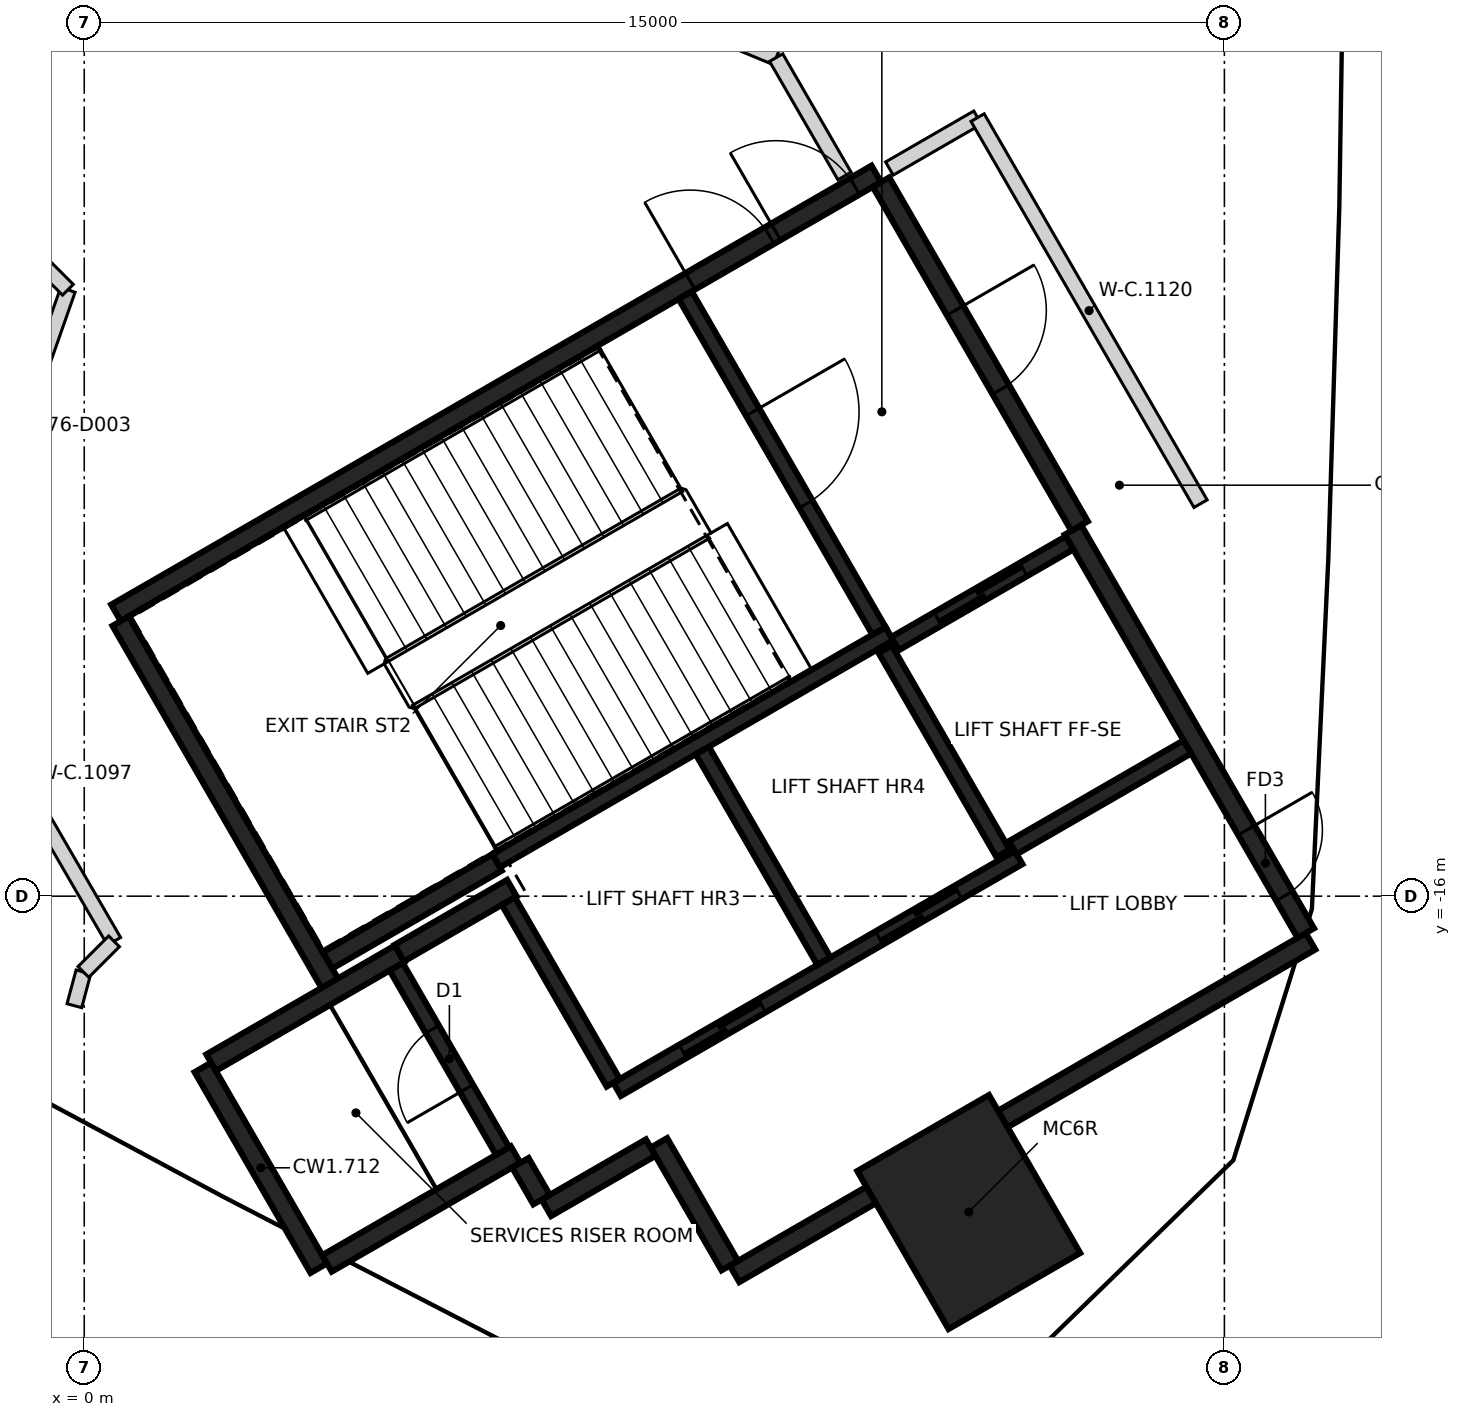
"""IFC4 building model, lengths in metres.
Left out: names, types, materials, properties, quantities, classifications, styles, units other than length and angle.
Written with IfcOpenShell. Run it as: python <this file> out.ifc"""

import sys

from ifc_helpers import new_model, si_unit, direction, frame, frame_2d, origin, origin_2d, place, context, subcontext, project, spatial, rectangle, extrude, element, fill, save


model = new_model("IFC4")
c1 = context("Model", 3, precision=1e-05, world=origin(), true_north=direction((0.0, 1.0)))
c2 = subcontext(c1, "Body", "Model", "MODEL_VIEW")
j1 = project(units=[si_unit("LENGTHUNIT", "METRE"), si_unit("PLANEANGLEUNIT", "RADIAN")], contexts=[c1])
p1 = place(None, origin())
s1 = spatial("IfcSite", under=j1, at=p1, CompositionType="ELEMENT")
p2 = place(p1, origin())
s2 = spatial("IfcBuilding", under=s1, at=p2, CompositionType="ELEMENT")
p3 = place(p2, frame((0.0, 0.0, 301.8)))
s3 = spatial("IfcBuildingStorey", under=s2, at=p3, CompositionType="ELEMENT", Elevation=301.8)
p4 = place(p3, frame((11.637, -20.155, -0.4), z_axis=(0.0, 0.0, 1.0), x_axis=(-0.5, 0.866025403784, 0.0)))
e1 = element("IfcColumn", 1, at=p4, inside=s3, PredefinedType="COLUMN", context=c2, shape_type="SweptSolid", body=[
    extrude(rectangle(XDim=2.4, YDim=2.0, at=origin_2d()), origin(), (0.0, 0.0, 1.0), 4.85),
])
p5 = place(p3, frame((0.417, -12.273, 0.0), z_axis=(0.0, 0.0, 1.0), x_axis=(0.866021906294, 0.500006057782, 0.0)))
e2 = element("IfcWall", 2, at=p5, inside=s3, PredefinedType="SHEAR", context=c2, shape_type="SweptSolid", body=[
    extrude(rectangle(XDim=11.55, YDim=0.25, at=frame_2d((5.775, 0.0))), origin(), (0.0, 0.0, 1.0), 4.45),
])
p6 = place(p5, frame((10.025, 0.0, 0.0)))
e3 = element("IfcOpeningElement", 3, at=p6, cuts=e2, PredefinedType="OPENING", context=c2, shape_type="SweptSolid", body=[
    extrude(rectangle(XDim=1.2, YDim=2.1, at=frame_2d((0.6, 1.05))), frame((0.0, 0.135, 0.0), z_axis=(0.0, -1.0, 0.0), x_axis=(1.0, 0.0, 0.0)), (0.0, 0.0, 1.0), 0.27),
])
p7 = place(p5, frame((8.725, 0.0, 0.0)))
e4 = element("IfcOpeningElement", 4, at=p7, cuts=e2, PredefinedType="OPENING", context=c2, shape_type="SweptSolid", body=[
    extrude(rectangle(XDim=1.2, YDim=2.1, at=frame_2d((0.6, 1.05))), frame((0.0, 0.135, 0.0), z_axis=(0.0, -1.0, 0.0), x_axis=(1.0, 0.0, 0.0)), (0.0, 0.0, 1.0), 0.27),
])
p8 = place(p3, frame((16.133, -16.594, 0.0), z_axis=(0.0, 0.0, 1.0), x_axis=(-0.866022959057, -0.500004234368, 0.0)))
e5 = element("IfcWall", 5, at=p8, inside=s3, PredefinedType="SHEAR", context=c2, shape_type="SweptSolid", body=[
    extrude(rectangle(XDim=8.75, YDim=0.25, at=frame_2d((4.375, 0.0))), origin(), (0.0, 0.0, 1.0), 4.45),
])
p9 = place(p3, frame((13.008, -11.181, 0.0), z_axis=(0.0, 0.0, 1.0), x_axis=(0.500001955336, -0.866024274868, 0.0)))
e6 = element("IfcWall", 6, at=p9, inside=s3, PredefinedType="SHEAR", context=c2, shape_type="SweptSolid", body=[
    extrude(rectangle(XDim=6.125, YDim=0.25, at=frame_2d((3.062, 0.0))), origin(), (0.0, 0.0, 1.0), 4.45),
])
p10 = place(p9, frame((4.563, 0.0, 0.0)))
e7 = element("IfcOpeningElement", 7, at=p10, cuts=e6, PredefinedType="OPENING", context=c2, shape_type="SweptSolid", body=[
    extrude(rectangle(XDim=1.0, YDim=2.1, at=frame_2d((0.5, 1.05))), frame((0.0, 0.135, 0.0), z_axis=(0.0, -1.0, 0.0), x_axis=(1.0, 0.0, 0.0)), (0.0, 0.0, 1.0), 0.27),
])
p11 = place(p3, frame((3.235, -17.153, 0.0), z_axis=(0.0, 0.0, 1.0), x_axis=(-0.500008851346, 0.866020293397, 0.0)))
e8 = element("IfcWall", 8, at=p11, inside=s3, PredefinedType="SHEAR", context=c2, shape_type="SweptSolid", body=[
    extrude(rectangle(XDim=5.51, YDim=0.25, at=frame_2d((2.755, 0.0))), origin(), (0.0, 0.0, 1.0), 4.45),
])
p12 = place(p3, frame((10.483, -6.606, 0.0), z_axis=(0.0, 0.0, 1.0), x_axis=(0.49999885962, -0.866026062182, 0.0)))
e9 = element("IfcWall", 9, at=p12, inside=s3, PredefinedType="SHEAR", context=c2, shape_type="SweptSolid", body=[
    extrude(rectangle(XDim=5.225, YDim=0.25, at=frame_2d((2.612, 0.0))), origin(), (0.0, 0.0, 1.0), 4.45),
])
p13 = place(p12, frame((1.95, 0.0, 0.0)))
e10 = element("IfcOpeningElement", 10, at=p13, cuts=e9, PredefinedType="OPENING", context=c2, shape_type="SweptSolid", body=[
    extrude(rectangle(XDim=1.2, YDim=2.1, at=frame_2d((0.6, 1.05))), frame((0.0, 0.135, 0.0), z_axis=(0.0, -1.0, 0.0), x_axis=(1.0, 0.0, 0.0)), (0.0, 0.0, 1.0), 0.27),
])
p14 = place(p3, frame((3.085, -20.894, 0.0), z_axis=(0.0, 0.0, 1.0), x_axis=(-0.499978833458, 0.866037623948, 0.0)))
e11 = element("IfcWall", 11, at=p14, inside=s3, PredefinedType="SHEAR", context=c2, shape_type="SweptSolid", body=[
    extrude(rectangle(XDim=3.05, YDim=0.25, at=frame_2d((1.525, 0.0))), origin(), (0.0, 0.0, 1.0), 4.45),
])
p15 = place(p3, frame((1.669, -18.19, 0.0), z_axis=(0.0, 0.0, 1.0), x_axis=(0.866042235819, 0.499970844928, 0.0)))
e12 = element("IfcWall", 12, at=p15, inside=s3, PredefinedType="SHEAR", context=c2, shape_type="SweptSolid", body=[
    extrude(rectangle(XDim=2.865, YDim=0.25, at=frame_2d((1.432, 0.0))), origin(), (0.0, 0.0, 1.0), 4.45),
])
p16 = place(p3, frame((5.675, -19.399, 0.0), z_axis=(0.0, 0.0, 1.0), x_axis=(-0.866026637627, -0.499997862916, 0.0)))
e13 = element("IfcWall", 13, at=p16, inside=s3, PredefinedType="SHEAR", context=c2, shape_type="SweptSolid", body=[
    extrude(rectangle(XDim=2.865, YDim=0.25, at=frame_2d((1.432, 0.0))), origin(), (0.0, 0.0, 1.0), 4.45),
])
p17 = place(p3, frame((5.431, -15.556, 0.0), z_axis=(0.0, 0.0, 1.0), x_axis=(-0.866022940537, -0.500004266446, 0.0)))
e14 = element("IfcWall", 14, at=p17, inside=s3, PredefinedType="SHEAR", context=c2, shape_type="SweptSolid", body=[
    extrude(rectangle(XDim=2.575, YDim=0.25, at=frame_2d((1.287, 0.0))), origin(), (0.0, 0.0, 1.0), 4.45),
])
p18 = place(p3, frame((8.493, -20.86, 0.0), z_axis=(0.0, 0.0, 1.0), x_axis=(-0.500039802285, 0.866002422705, 0.0)))
e15 = element("IfcWall", 15, at=p18, inside=s3, PredefinedType="SHEAR", context=c2, shape_type="SweptSolid", body=[
    extrude(rectangle(XDim=1.865, YDim=0.25, at=frame_2d((0.932, 0.0))), origin(), (0.0, 0.0, 1.0), 4.45),
])
p19 = place(p3, frame((4.145, -16.749, 0.0), z_axis=(0.0, 0.0, 1.0), x_axis=(0.866038183914, 0.499977863513, 0.0)))
e16 = element("IfcWall", 16, at=p19, inside=s3, PredefinedType="SHEAR", context=c2, shape_type="SweptSolid", body=[
    extrude(rectangle(XDim=1.71, YDim=0.25, at=frame_2d((0.855, 0.0))), origin(), (0.0, 0.0, 1.0), 4.45),
])
p20 = place(p3, frame((7.452, -19.308, 0.0), z_axis=(0.0, 0.0, 1.0), x_axis=(-0.866044474677, -0.49996696679, 0.0)))
e17 = element("IfcWall", 17, at=p20, inside=s3, PredefinedType="SHEAR", context=c2, shape_type="SweptSolid", body=[
    extrude(rectangle(XDim=1.584, YDim=0.25, at=frame_2d((0.792, 0.0))), origin(), (0.0, 0.0, 1.0), 4.45),
])
p21 = place(p3, frame((6.017, -19.992, 0.0), z_axis=(0.0, 0.0, 1.0), x_axis=(-0.500364886717, 0.865814633822, 0.0)))
e18 = element("IfcWall", 18, at=p21, inside=s3, PredefinedType="SHEAR", context=c2, shape_type="SweptSolid", body=[
    extrude(rectangle(XDim=0.559, YDim=0.25, at=frame_2d((0.28, 0.0))), origin(), (0.0, 0.0, 1.0), 4.45),
])
p22 = place(p3, frame((5.419, -15.534, 0.0), z_axis=(0.0, 0.0, 1.0), x_axis=(0.866029065029, 0.499993658486, 0.0)))
e19 = element("IfcWall", 19, at=p22, inside=s3, PredefinedType="SHEAR", context=c2, shape_type="SweptSolid", body=[
    extrude(rectangle(XDim=5.974, YDim=0.2, at=frame_2d((2.987, 0.0))), origin(), (0.0, 0.0, 1.0), 4.45),
])
p23 = place(p3, frame((7.01, -18.542, 0.0), z_axis=(0.0, 0.0, 1.0), x_axis=(0.866030299012, 0.499991521122, 0.0)))
e20 = element("IfcWall", 20, at=p23, inside=s3, PredefinedType="SHEAR", context=c2, shape_type="SweptSolid", body=[
    extrude(rectangle(XDim=6.1, YDim=0.2, at=frame_2d((3.05, 0.0))), origin(), (0.0, 0.0, 1.0), 4.45),
])
p24 = place(p23, frame((1.0, 0.0, 0.0)))
e21 = element("IfcOpeningElement", 21, at=p24, cuts=e20, PredefinedType="OPENING", context=c2, shape_type="SweptSolid", body=[
    extrude(rectangle(XDim=1.2, YDim=2.1, at=frame_2d((0.6, 1.05))), frame((0.0, 0.11, 0.0), z_axis=(0.0, -1.0, 0.0), x_axis=(1.0, 0.0, 0.0)), (0.0, 0.0, 1.0), 0.22),
])
p25 = place(p23, frame((3.982, 0.0, 0.0)))
e22 = element("IfcOpeningElement", 22, at=p25, cuts=e20, PredefinedType="OPENING", context=c2, shape_type="SweptSolid", body=[
    extrude(rectangle(XDim=1.2, YDim=2.1, at=frame_2d((0.6, 1.05))), frame((0.0, 0.11, 0.0), z_axis=(0.0, -1.0, 0.0), x_axis=(1.0, 0.0, 0.0)), (0.0, 0.0, 1.0), 0.22),
])
p26 = place(p3, frame((7.906, -8.094, 0.0), z_axis=(0.0, 0.0, 1.0), x_axis=(0.500027839223, -0.866009330205, 0.0)))
e23 = element("IfcWall", 23, at=p26, inside=s3, PredefinedType="SHEAR", context=c2, shape_type="SweptSolid", body=[
    extrude(rectangle(XDim=5.098, YDim=0.2, at=frame_2d((2.549, 0.0))), origin(), (0.0, 0.0, 1.0), 4.45),
])
p27 = place(p26, frame((1.774, 0.0, 0.0)))
e24 = element("IfcOpeningElement", 24, at=p27, cuts=e23, PredefinedType="OPENING", context=c2, shape_type="SweptSolid", body=[
    extrude(rectangle(XDim=1.4, YDim=2.1, at=frame_2d((0.7, 1.05))), frame((0.0, 0.11, 0.0), z_axis=(0.0, -1.0, 0.0), x_axis=(1.0, 0.0, 0.0)), (0.0, 0.0, 1.0), 0.22),
])
p28 = place(p3, frame((8.132, -14.084, 0.0), z_axis=(0.0, 0.0, 1.0), x_axis=(0.499997778408, -0.866026686418, 0.0)))
e25 = element("IfcWall", 25, at=p28, inside=s3, PredefinedType="SHEAR", context=c2, shape_type="SweptSolid", body=[
    extrude(rectangle(XDim=3.198, YDim=0.2, at=frame_2d((1.599, 0.0))), origin(), (0.0, 0.0, 1.0), 4.45),
])
p29 = place(p3, frame((5.503, -19.352, 0.0), z_axis=(0.0, 0.0, 1.0), x_axis=(-0.499986818241, 0.866033014143, 0.0)))
e26 = element("IfcWall", 26, at=p29, inside=s3, PredefinedType="SHEAR", context=c2, shape_type="SweptSolid", body=[
    extrude(rectangle(XDim=2.798, YDim=0.2, at=frame_2d((1.399, 0.0))), origin(), (0.0, 0.0, 1.0), 4.45),
])
p30 = place(p29, frame((0.949, 0.0, 0.0)))
e27 = element("IfcOpeningElement", 27, at=p30, cuts=e26, PredefinedType="OPENING", context=c2, shape_type="SweptSolid", body=[
    extrude(rectangle(XDim=0.9, YDim=2.1, at=frame_2d((0.45, 1.05))), frame((0.0, 0.11, 0.0), z_axis=(0.0, -1.0, 0.0), x_axis=(1.0, 0.0, 0.0)), (0.0, 0.0, 1.0), 0.22),
])
p31 = place(p3, frame((6.96, -18.455, 0.0), z_axis=(0.0, 0.0, 1.0), x_axis=(-0.499926705758, 0.866067716099, 0.0)))
e28 = element("IfcWall", 28, at=p31, inside=s3, PredefinedType="SHEAR", context=c2, shape_type="SweptSolid", body=[
    extrude(rectangle(XDim=2.759, YDim=0.2, at=frame_2d((1.38, 0.0))), origin(), (0.0, 0.0, 1.0), 4.45),
])
p32 = place(p3, frame((12.088, -15.437, 0.0), z_axis=(0.0, 0.0, 1.0), x_axis=(-0.500026960575, 0.86600983753, 0.0)))
e29 = element("IfcWall", 29, at=p32, inside=s3, PredefinedType="SHEAR", context=c2, shape_type="SweptSolid", body=[
    extrude(rectangle(XDim=3.1, YDim=0.2, at=frame_2d((1.55, 0.0))), origin(), (0.0, 0.0, 1.0), 4.45),
])
p33 = place(p3, frame((10.666, -12.678, 0.0), z_axis=(0.0, 0.0, 1.0), x_axis=(0.866018407898, 0.500012117035, 0.0)))
e30 = element("IfcWall", 30, at=p33, inside=s3, PredefinedType="SHEAR", context=c2, shape_type="SweptSolid", body=[
    extrude(rectangle(XDim=2.651, YDim=0.2, at=frame_2d((1.325, 0.0))), origin(), (0.0, 0.0, 1.0), 4.45),
])
p34 = place(p33, frame((0.652, 0.0, 0.0)))
e31 = element("IfcOpeningElement", 31, at=p34, cuts=e30, PredefinedType="OPENING", context=c2, shape_type="SweptSolid", body=[
    extrude(rectangle(XDim=1.3, YDim=2.1, at=frame_2d((0.65, 1.05))), frame((0.0, 0.11, 0.0), z_axis=(0.0, -1.0, 0.0), x_axis=(1.0, 0.0, 0.0)), (0.0, 0.0, 1.0), 0.22),
])
p35 = place(p3, frame((14.512, -14.037, 0.0), z_axis=(0.0, 0.0, 1.0), x_axis=(-0.866018407898, -0.500012117035, 0.0)))
e32 = element("IfcWall", 32, at=p35, inside=s3, PredefinedType="SHEAR", context=c2, shape_type="SweptSolid", body=[
    extrude(rectangle(XDim=2.651, YDim=0.2, at=frame_2d((1.325, 0.0))), origin(), (0.0, 0.0, 1.0), 4.45),
])
p36 = place(p3, frame((-1.861, -12.71, 0.0), z_axis=(0.0, 0.0, 1.0), x_axis=(0.501790506815, -0.864989183326, 0.0)))
e33 = element("IfcWall", 33, at=p36, inside=s3, PredefinedType="PARTITIONING", context=c2, shape_type="SweptSolid", body=[
    extrude(rectangle(XDim=4.49, YDim=0.2, at=frame_2d((2.245, 0.0))), origin(), (0.0, 0.0, 1.0), 4.45),
])
p37 = place(p3, frame((-1.861, -12.71, 0.0), z_axis=(0.0, 0.0, 1.0), x_axis=(0.331282665584, 0.943531555108, 0.0)))
e34 = element("IfcWall", 34, at=p37, inside=s3, PredefinedType="PARTITIONING", context=c2, shape_type="SweptSolid", body=[
    extrude(rectangle(XDim=4.969, YDim=0.2, at=frame_2d((2.484, 0.0))), origin(), (0.0, 0.0, 1.0), 4.45),
])
p38 = place(p37, frame((1.982, 0.0, 0.0)))
e35 = element("IfcOpeningElement", 35, at=p38, cuts=e34, PredefinedType="OPENING", context=c2, shape_type="SweptSolid", body=[
    extrude(rectangle(XDim=1.0, YDim=2.1, at=frame_2d((0.5, 1.05))), frame((0.0, 0.11, 0.0), z_axis=(0.0, -1.0, 0.0), x_axis=(1.0, 0.0, 0.0)), (0.0, 0.0, 1.0), 0.22),
])
p39 = place(p3, frame((-0.911, -7.326, 0.0), z_axis=(0.0, 0.0, 1.0), x_axis=(0.706982738249, -0.707230802368, 0.0)))
e36 = element("IfcWall", 36, at=p39, inside=s3, PredefinedType="PARTITIONING", context=c2, shape_type="SweptSolid", body=[
    extrude(rectangle(XDim=0.984, YDim=0.2, at=frame_2d((0.492, 0.0))), origin(), (0.0, 0.0, 1.0), 4.45),
])
p40 = place(p3, frame((-0.13, -17.441, 0.0), z_axis=(0.0, 0.0, 1.0), x_axis=(0.258753790643, 0.965943308806, 0.0)))
e37 = element("IfcWall", 37, at=p40, inside=s3, PredefinedType="PARTITIONING", context=c2, shape_type="SweptSolid", body=[
    extrude(rectangle(XDim=0.459, YDim=0.2, at=frame_2d((0.23, 0.0))), origin(), (0.0, 0.0, 1.0), 4.45),
])
p41 = place(p3, frame((-0.011, -16.997, 0.0), z_axis=(0.0, 0.0, 1.0), x_axis=(0.707106781187, 0.707106781187, 0.0)))
e38 = element("IfcWall", 38, at=p41, inside=s3, PredefinedType="PARTITIONING", context=c2, shape_type="SweptSolid", body=[
    extrude(rectangle(XDim=0.57, YDim=0.2, at=frame_2d((0.285, 0.0))), origin(), (0.0, 0.0, 1.0), 4.45),
])
p42 = place(p3, frame((7.316, -4.229, 0.0), z_axis=(0.0, 0.0, 1.0), x_axis=(0.923978372606, -0.382444724054, 0.0)))
e39 = element("IfcWall", 39, at=p42, inside=s3, PredefinedType="PARTITIONING", context=c2, shape_type="SweptSolid", body=[
    extrude(rectangle(XDim=1.934, YDim=0.2, at=frame_2d((0.967, 0.0))), origin(), (0.0, 0.0, 1.0), 4.45),
])
p43 = place(p3, frame((9.103, -4.968, 0.0), z_axis=(0.0, 0.0, 1.0), x_axis=(0.500008413725, -0.866020546064, 0.0)))
e40 = element("IfcWall", 40, at=p43, inside=s3, PredefinedType="PARTITIONING", context=c2, shape_type="SweptSolid", body=[
    extrude(rectangle(XDim=1.798, YDim=0.2, at=frame_2d((0.899, 0.0))), origin(), (0.0, 0.0, 1.0), 4.45),
])
p44 = place(p3, frame((10.593, -6.427, 0.0), z_axis=(0.0, 0.0, 1.0), x_axis=(0.865912429188, 0.500195626709, 0.0)))
e41 = element("IfcWall", 41, at=p44, inside=s3, PredefinedType="PARTITIONING", context=c2, shape_type="SweptSolid", body=[
    extrude(rectangle(XDim=1.34, YDim=0.2, at=frame_2d((0.67, 0.0))), origin(), (0.0, 0.0, 1.0), 4.45),
])
p45 = place(p3, frame((11.753, -5.757, 0.0), z_axis=(0.0, 0.0, 1.0), x_axis=(0.500118781305, -0.865956814504, 0.0)))
e42 = element("IfcWall", 42, at=p45, inside=s3, PredefinedType="PARTITIONING", context=c2, shape_type="SweptSolid", body=[
    extrude(rectangle(XDim=5.865, YDim=0.2, at=frame_2d((2.933, 0.0))), origin(), (0.0, 0.0, 1.0), 4.45),
])
p46 = place(p34, origin())
e43 = element("IfcDoor", 43, at=p46, inside=s3, OperationType="SLIDING_TO_LEFT", PredefinedType="DOOR", context=c2, shape_type="SweptSolid", body=[
    extrude(rectangle(XDim=1.3, YDim=2.1, at=frame_2d((0.65, 1.05))), frame((0.0, 0.025, 0.0), z_axis=(0.0, -1.0, 0.0), x_axis=(1.0, 0.0, 0.0)), (0.0, 0.0, 1.0), 0.05),
])
fill(e31, e43)
p47 = place(p24, origin())
e44 = element("IfcDoor", 44, at=p47, inside=s3, OperationType="DOUBLE_DOOR_SLIDING", PredefinedType="DOOR", context=c2, shape_type="SweptSolid", body=[
    extrude(rectangle(XDim=1.2, YDim=2.1, at=frame_2d((0.6, 1.05))), frame((0.0, 0.025, 0.0), z_axis=(0.0, -1.0, 0.0), x_axis=(1.0, 0.0, 0.0)), (0.0, 0.0, 1.0), 0.05),
])
fill(e21, e44)
p48 = place(p25, origin())
e45 = element("IfcDoor", 45, at=p48, inside=s3, OperationType="DOUBLE_DOOR_SLIDING", PredefinedType="DOOR", context=c2, shape_type="SweptSolid", body=[
    extrude(rectangle(XDim=1.2, YDim=2.1, at=frame_2d((0.6, 1.05))), frame((0.0, 0.025, 0.0), z_axis=(0.0, -1.0, 0.0), x_axis=(1.0, 0.0, 0.0)), (0.0, 0.0, 1.0), 0.05),
])
fill(e22, e45)
p49 = place(p10, origin())
e46 = element("IfcDoor", 46, at=p49, inside=s3, OperationType="SINGLE_SWING_LEFT", PredefinedType="DOOR", context=c2, shape_type="SweptSolid", body=[
    extrude(rectangle(XDim=1.0, YDim=2.1, at=frame_2d((0.5, 1.05))), frame((0.0, 0.025, 0.0), z_axis=(0.0, -1.0, 0.0), x_axis=(1.0, 0.0, 0.0)), (0.0, 0.0, 1.0), 0.05),
])
fill(e7, e46)
p50 = place(p6, origin())
e47 = element("IfcDoor", 47, at=p50, inside=s3, OperationType="SINGLE_SWING_LEFT", PredefinedType="DOOR", context=c2, shape_type="SweptSolid", body=[
    extrude(rectangle(XDim=1.2, YDim=2.1, at=frame_2d((0.6, 1.05))), frame((0.0, 0.025, 0.0), z_axis=(0.0, -1.0, 0.0), x_axis=(1.0, 0.0, 0.0)), (0.0, 0.0, 1.0), 0.05),
])
fill(e3, e47)
p51 = place(p7, origin())
e48 = element("IfcDoor", 48, at=p51, inside=s3, OperationType="SINGLE_SWING_RIGHT", PredefinedType="DOOR", context=c2, shape_type="SweptSolid", body=[
    extrude(rectangle(XDim=1.2, YDim=2.1, at=frame_2d((0.6, 1.05))), frame((0.0, 0.025, 0.0), z_axis=(0.0, -1.0, 0.0), x_axis=(1.0, 0.0, 0.0)), (0.0, 0.0, 1.0), 0.05),
])
fill(e4, e48)
p52 = place(p27, origin())
e49 = element("IfcDoor", 49, at=p52, inside=s3, OperationType="SINGLE_SWING_LEFT", PredefinedType="DOOR", context=c2, shape_type="SweptSolid", body=[
    extrude(rectangle(XDim=1.4, YDim=2.1, at=frame_2d((0.7, 1.05))), frame((0.0, 0.025, 0.0), z_axis=(0.0, -1.0, 0.0), x_axis=(1.0, 0.0, 0.0)), (0.0, 0.0, 1.0), 0.05),
])
fill(e24, e49)
p53 = place(p30, origin())
e50 = element("IfcDoor", 50, at=p53, inside=s3, OperationType="SINGLE_SWING_RIGHT", PredefinedType="DOOR", context=c2, shape_type="SweptSolid", body=[
    extrude(rectangle(XDim=0.9, YDim=2.1, at=frame_2d((0.45, 1.05))), frame((0.0, 0.025, 0.0), z_axis=(0.0, -1.0, 0.0), x_axis=(1.0, 0.0, 0.0)), (0.0, 0.0, 1.0), 0.05),
])
fill(e27, e50)
p54 = place(p13, origin())
e51 = element("IfcDoor", 51, at=p54, inside=s3, OperationType="SINGLE_SWING_RIGHT", PredefinedType="DOOR", context=c2, shape_type="SweptSolid", body=[
    extrude(rectangle(XDim=1.2, YDim=2.1, at=frame_2d((0.6, 1.05))), frame((0.0, 0.025, 0.0), z_axis=(0.0, -1.0, 0.0), x_axis=(1.0, 0.0, 0.0)), (0.0, 0.0, 1.0), 0.05),
])
fill(e10, e51)
save(model, sys.argv[1])
